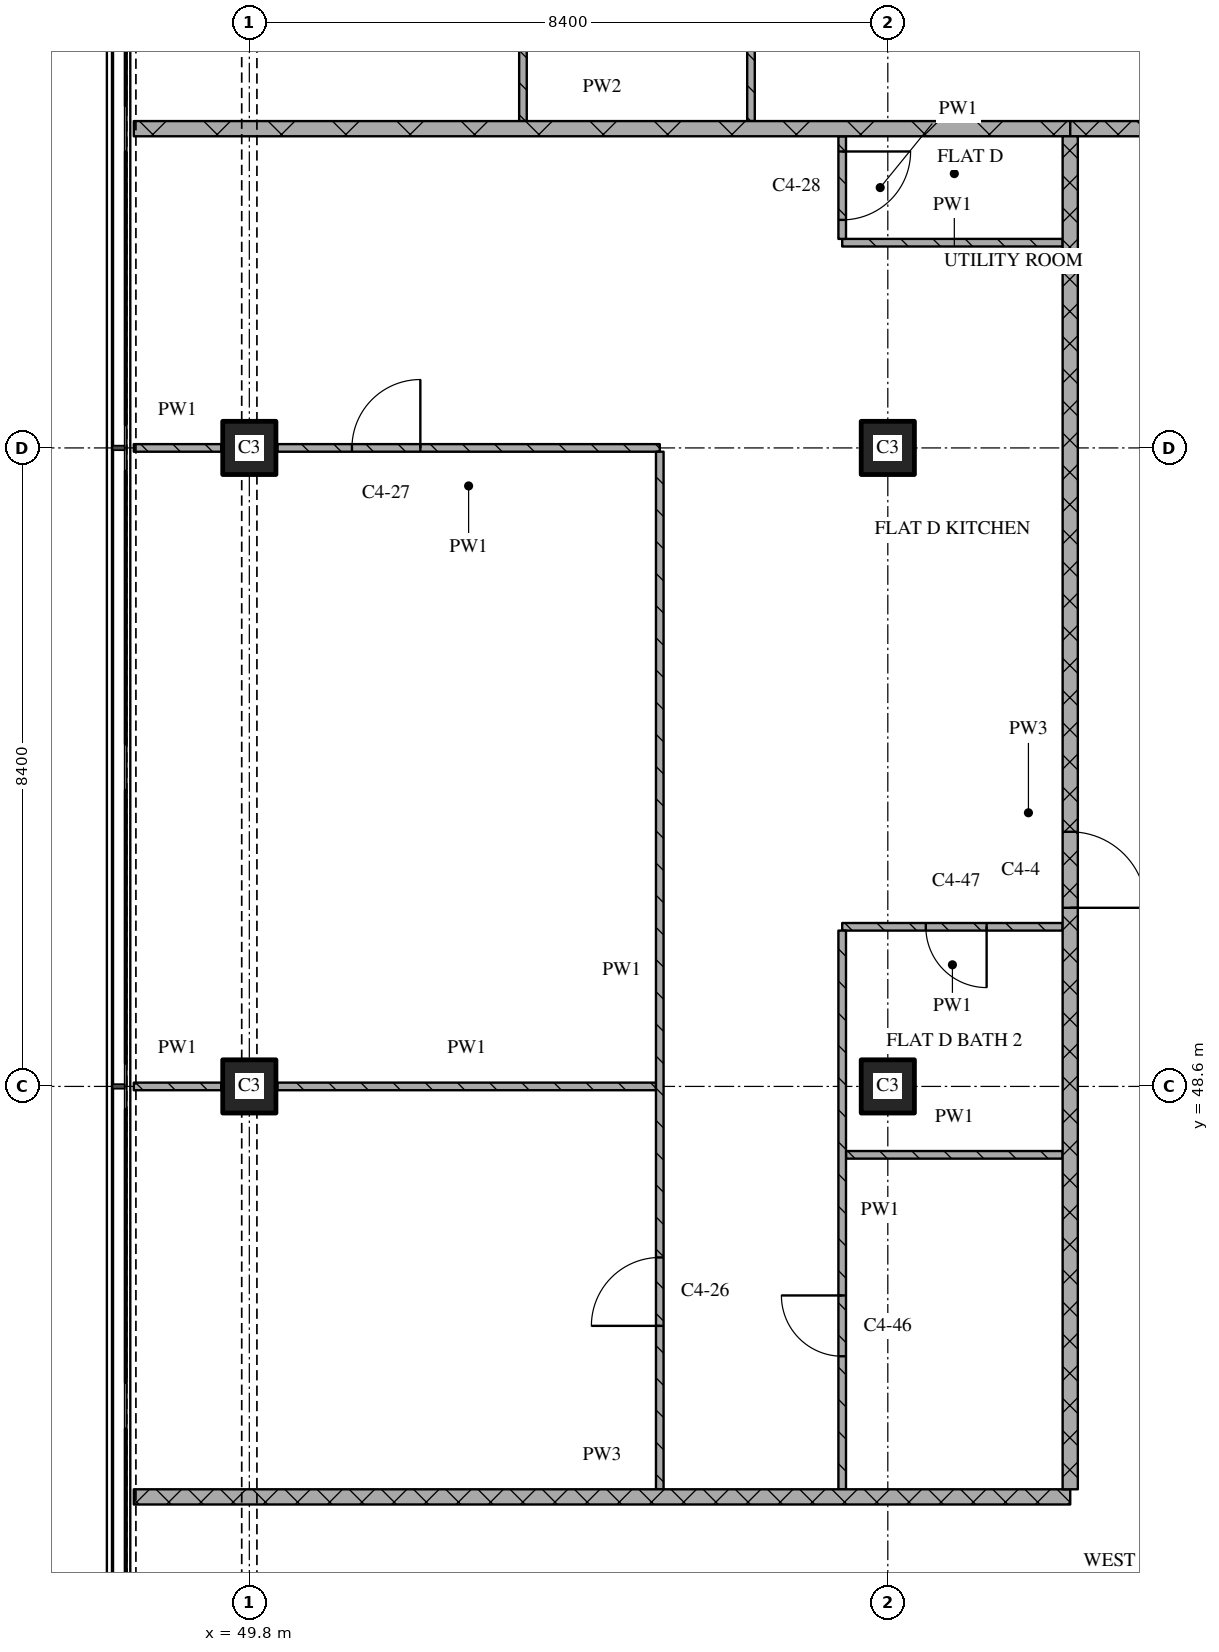
"""IFC4 building model, lengths in metres.
Left out: names, types, materials, properties, quantities, classifications, styles, units other than length and angle.
Written with IfcOpenShell. Run it as: python <this file> out.ifc"""

import sys

from ifc_helpers import new_model, si_unit, direction, frame, frame_2d, origin, origin_2d, place, context, subcontext, project, spatial, rectangle, extrude, element, fill, save


model = new_model("IFC4")
c1 = context("Model", 3, precision=1e-05, world=origin(), true_north=direction((0.0, 1.0)))
c2 = subcontext(c1, "Body", "Model", "MODEL_VIEW")
j1 = project(units=[si_unit("LENGTHUNIT", "METRE"), si_unit("PLANEANGLEUNIT", "RADIAN")], contexts=[c1])
p1 = place(None, origin())
s1 = spatial("IfcSite", under=j1, at=p1, CompositionType="ELEMENT")
p2 = place(p1, origin())
s2 = spatial("IfcBuilding", under=s1, at=p2, CompositionType="ELEMENT")
p3 = place(p2, frame((0.0, 0.0, 183.45)))
s3 = spatial("IfcBuildingStorey", under=s2, at=p3, CompositionType="ELEMENT", Elevation=183.45)
for number, where, z_axis, x_axis in (
    (1, (49.8, 48.6, 0.0), (0.0, 0.0, 1.0), (1.0, 0.0, 0.0)),
    (2, (49.8, 57.0, 0.0), (0.0, 0.0, 1.0), (1.0, 0.0, 0.0)),
    (3, (58.2, 48.6, 0.0), (0.0, 0.0, 1.0), (1.0, 0.0, 0.0)),
    (4, (58.2, 57.0, 0.0), (0.0, 0.0, 1.0), (1.0, 0.0, 0.0)),
):
    element("IfcColumn", number, at=place(p3, frame(where, z_axis=z_axis, x_axis=x_axis)), inside=s3, PredefinedType="COLUMN", context=c2, shape_type="SweptSolid", body=[
        extrude(rectangle(XDim=0.7, YDim=0.7, at=origin_2d()), origin(), (0.0, 0.0, 1.0), 3.6),
    ])
p4 = place(p3, frame((48.28, 43.2, 0.0), z_axis=(0.0, 0.0, 1.0), x_axis=(1.0, 0.0, 0.0)))
e5 = element("IfcWall", 5, at=p4, inside=s3, PredefinedType="PARTITIONING", context=c2, shape_type="SweptSolid", body=[
    extrude(rectangle(XDim=12.32, YDim=0.2, at=frame_2d((6.16, 0.0))), origin(), (0.0, 0.0, 1.0), 3.32),
])
p5 = place(p3, frame((57.65, 47.7, 0.0), z_axis=(0.0, 0.0, 1.0), x_axis=(1.0, 0.0, 0.0)))
e6 = element("IfcWall", 6, at=p5, inside=s3, PredefinedType="PARTITIONING", context=c2, shape_type="SweptSolid", body=[
    extrude(rectangle(XDim=2.85, YDim=0.1, at=frame_2d((1.425, 0.0))), origin(), (0.0, 0.0, 1.0), 3.32),
])
p6 = place(p3, frame((48.28, 48.6, 0.0), z_axis=(0.0, 0.0, 1.0), x_axis=(1.0, 0.0, 0.0)))
e7 = element("IfcWall", 7, at=p6, inside=s3, PredefinedType="PARTITIONING", context=c2, shape_type="SweptSolid", body=[
    extrude(rectangle(XDim=1.15, YDim=0.1, at=frame_2d((0.575, 0.0))), origin(), (0.0, 0.0, 1.0), 3.32),
])
p7 = place(p3, frame((50.17, 48.6, 0.0), z_axis=(0.0, 0.0, 1.0), x_axis=(1.0, 0.0, 0.0)))
e8 = element("IfcWall", 8, at=p7, inside=s3, PredefinedType="PARTITIONING", context=c2, shape_type="SweptSolid", body=[
    extrude(rectangle(XDim=4.98, YDim=0.1, at=frame_2d((2.49, 0.0))), origin(), (0.0, 0.0, 1.0), 3.32),
])
p8 = place(p3, frame((60.5, 50.7, 0.0), z_axis=(0.0, 0.0, 1.0), x_axis=(-1.0, 0.0, 0.0)))
e9 = element("IfcWall", 9, at=p8, inside=s3, PredefinedType="PARTITIONING", context=c2, shape_type="SweptSolid", body=[
    extrude(rectangle(XDim=2.9, YDim=0.1, at=frame_2d((1.45, 0.0))), origin(), (0.0, 0.0, 1.0), 3.32),
])
p9 = place(p8, frame((1.0, 0.0, 0.0)))
e10 = element("IfcOpeningElement", 10, at=p9, cuts=e9, PredefinedType="OPENING", context=c2, shape_type="SweptSolid", body=[
    extrude(rectangle(XDim=0.8, YDim=2.1, at=frame_2d((0.4, 1.05))), frame((0.0, 0.06, 0.0), z_axis=(0.0, -1.0, 0.0), x_axis=(1.0, 0.0, 0.0)), (0.0, 0.0, 1.0), 0.12),
])
p10 = place(p3, frame((48.28, 57.0, 0.0), z_axis=(0.0, 0.0, 1.0), x_axis=(1.0, 0.0, 0.0)))
e11 = element("IfcWall", 11, at=p10, inside=s3, PredefinedType="PARTITIONING", context=c2, shape_type="SweptSolid", body=[
    extrude(rectangle(XDim=1.15, YDim=0.1, at=frame_2d((0.575, 0.0))), origin(), (0.0, 0.0, 1.0), 3.32),
])
p11 = place(p3, frame((55.2, 57.0, 0.0), z_axis=(0.0, 0.0, 1.0), x_axis=(-1.0, 0.0, 0.0)))
e12 = element("IfcWall", 12, at=p11, inside=s3, PredefinedType="PARTITIONING", context=c2, shape_type="SweptSolid", body=[
    extrude(rectangle(XDim=5.03, YDim=0.1, at=frame_2d((2.515, 0.0))), origin(), (0.0, 0.0, 1.0), 3.32),
])
p12 = place(p11, frame((3.15, 0.0, 0.0)))
e13 = element("IfcOpeningElement", 13, at=p12, cuts=e12, PredefinedType="OPENING", context=c2, shape_type="SweptSolid", body=[
    extrude(rectangle(XDim=0.9, YDim=2.1, at=frame_2d((0.45, 1.05))), frame((0.0, 0.06, 0.0), z_axis=(0.0, -1.0, 0.0), x_axis=(1.0, 0.0, 0.0)), (0.0, 0.0, 1.0), 0.12),
])
p13 = place(p3, frame((57.6, 59.7, 0.0), z_axis=(0.0, 0.0, 1.0), x_axis=(1.0, 0.0, 0.0)))
e14 = element("IfcWall", 14, at=p13, inside=s3, PredefinedType="PARTITIONING", context=c2, shape_type="SweptSolid", body=[
    extrude(rectangle(XDim=2.9, YDim=0.1, at=frame_2d((1.45, 0.0))), origin(), (0.0, 0.0, 1.0), 3.32),
])
p14 = place(p3, frame((60.6, 61.2, 0.0), z_axis=(0.0, 0.0, 1.0), x_axis=(1.0, 0.0, 0.0)))
e15 = element("IfcWall", 15, at=p14, inside=s3, PredefinedType="PARTITIONING", context=c2, shape_type="SweptSolid", body=[
    extrude(rectangle(XDim=3.6, YDim=0.2, at=frame_2d((1.8, 0.0))), origin(), (0.0, 0.0, 1.0), 3.32),
])
p15 = place(p3, frame((48.28, 61.2, 0.0), z_axis=(0.0, 0.0, 1.0), x_axis=(1.0, 0.0, 0.0)))
e16 = element("IfcWall", 16, at=p15, inside=s3, PredefinedType="PARTITIONING", context=c2, shape_type="SweptSolid", body=[
    extrude(rectangle(XDim=12.32, YDim=0.2, at=frame_2d((6.16, 0.0))), origin(), (0.0, 0.0, 1.0), 3.32),
])
p16 = place(p3, frame((53.4, 65.35, 0.0), z_axis=(0.0, 0.0, 1.0), x_axis=(0.0, -1.0, 0.0)))
e17 = element("IfcWall", 17, at=p16, inside=s3, PredefinedType="PARTITIONING", context=c2, shape_type="SweptSolid", body=[
    extrude(rectangle(XDim=4.05, YDim=0.1, at=frame_2d((2.025, 0.0))), origin(), (0.0, 0.0, 1.0), 3.32),
])
p17 = place(p3, frame((55.2, 43.3, 0.0), z_axis=(0.0, 0.0, 1.0), x_axis=(0.0, 1.0, 0.0)))
e18 = element("IfcWall", 18, at=p17, inside=s3, PredefinedType="PARTITIONING", context=c2, shape_type="SweptSolid", body=[
    extrude(rectangle(XDim=13.65, YDim=0.1, at=frame_2d((6.825, 0.0))), origin(), (0.0, 0.0, 1.0), 3.32),
])
p18 = place(p17, frame((2.15, 0.0, 0.0)))
e19 = element("IfcOpeningElement", 19, at=p18, cuts=e18, PredefinedType="OPENING", context=c2, shape_type="SweptSolid", body=[
    extrude(rectangle(XDim=0.9, YDim=2.1, at=frame_2d((0.45, 1.05))), frame((0.0, 0.06, 0.0), z_axis=(0.0, -1.0, 0.0), x_axis=(1.0, 0.0, 0.0)), (0.0, 0.0, 1.0), 0.12),
])
p19 = place(p3, frame((56.4, 64.45, 0.0), z_axis=(0.0, 0.0, 1.0), x_axis=(0.0, -1.0, 0.0)))
e20 = element("IfcWall", 20, at=p19, inside=s3, PredefinedType="PARTITIONING", context=c2, shape_type="SweptSolid", body=[
    extrude(rectangle(XDim=3.15, YDim=0.1, at=frame_2d((1.575, 0.0))), origin(), (0.0, 0.0, 1.0), 3.32),
])
p20 = place(p3, frame((57.6, 50.65, 0.0), z_axis=(0.0, 0.0, 1.0), x_axis=(0.0, -1.0, 0.0)))
e21 = element("IfcWall", 21, at=p20, inside=s3, PredefinedType="PARTITIONING", context=c2, shape_type="SweptSolid", body=[
    extrude(rectangle(XDim=7.35, YDim=0.1, at=frame_2d((3.675, 0.0))), origin(), (0.0, 0.0, 1.0), 3.32),
])
p21 = place(p20, frame((4.8, 0.0, 0.0)))
e22 = element("IfcOpeningElement", 22, at=p21, cuts=e21, PredefinedType="OPENING", context=c2, shape_type="SweptSolid", body=[
    extrude(rectangle(XDim=0.8, YDim=2.1, at=frame_2d((0.4, 1.05))), frame((0.0, 0.06, 0.0), z_axis=(0.0, -1.0, 0.0), x_axis=(1.0, 0.0, 0.0)), (0.0, 0.0, 1.0), 0.12),
])
p22 = place(p3, frame((57.6, 61.1, 0.0), z_axis=(0.0, 0.0, 1.0), x_axis=(0.0, -1.0, 0.0)))
e23 = element("IfcWall", 23, at=p22, inside=s3, PredefinedType="PARTITIONING", context=c2, shape_type="SweptSolid", body=[
    extrude(rectangle(XDim=1.35, YDim=0.1, at=frame_2d((0.675, 0.0))), origin(), (0.0, 0.0, 1.0), 3.32),
])
p23 = place(p22, frame((0.2, 0.0, 0.0)))
e24 = element("IfcOpeningElement", 24, at=p23, cuts=e23, PredefinedType="OPENING", context=c2, shape_type="SweptSolid", body=[
    extrude(rectangle(XDim=0.9, YDim=2.1, at=frame_2d((0.45, 1.05))), frame((0.0, 0.06, 0.0), z_axis=(0.0, -1.0, 0.0), x_axis=(1.0, 0.0, 0.0)), (0.0, 0.0, 1.0), 0.12),
])
p24 = place(p3, frame((60.6, 43.3, 0.0), z_axis=(0.0, 0.0, 1.0), x_axis=(0.0, 1.0, 0.0)))
e25 = element("IfcWall", 25, at=p24, inside=s3, PredefinedType="PARTITIONING", context=c2, shape_type="SweptSolid", body=[
    extrude(rectangle(XDim=17.8, YDim=0.2, at=frame_2d((8.9, 0.0))), origin(), (0.0, 0.0, 1.0), 3.32),
])
p25 = place(p24, frame((7.65, 0.0, 0.0)))
e26 = element("IfcOpeningElement", 26, at=p25, cuts=e25, PredefinedType="OPENING", context=c2, shape_type="SweptSolid", body=[
    extrude(rectangle(XDim=1.0, YDim=2.1, at=frame_2d((0.5, 1.05))), frame((0.0, 0.11, 0.0), z_axis=(0.0, -1.0, 0.0), x_axis=(1.0, 0.0, 0.0)), (0.0, 0.0, 1.0), 0.22),
])
p26 = place(p9, origin())
e27 = element("IfcDoor", 27, at=p26, inside=s3, OperationType="SINGLE_SWING_LEFT", PredefinedType="DOOR", context=c2, shape_type="SweptSolid", body=[
    extrude(rectangle(XDim=0.8, YDim=2.1, at=frame_2d((0.4, 1.05))), frame((0.0, 0.025, 0.0), z_axis=(0.0, -1.0, 0.0), x_axis=(1.0, 0.0, 0.0)), (0.0, 0.0, 1.0), 0.05),
])
fill(e10, e27)
p27 = place(p12, origin())
e28 = element("IfcDoor", 28, at=p27, inside=s3, OperationType="SINGLE_SWING_RIGHT", PredefinedType="DOOR", context=c2, shape_type="SweptSolid", body=[
    extrude(rectangle(XDim=0.9, YDim=2.1, at=frame_2d((0.45, 1.05))), frame((0.0, 0.025, 0.0), z_axis=(0.0, -1.0, 0.0), x_axis=(1.0, 0.0, 0.0)), (0.0, 0.0, 1.0), 0.05),
])
fill(e13, e28)
p28 = place(p18, origin())
e29 = element("IfcDoor", 29, at=p28, inside=s3, OperationType="SINGLE_SWING_LEFT", PredefinedType="DOOR", context=c2, shape_type="SweptSolid", body=[
    extrude(rectangle(XDim=0.9, YDim=2.1, at=frame_2d((0.45, 1.05))), frame((0.0, 0.025, 0.0), z_axis=(0.0, -1.0, 0.0), x_axis=(1.0, 0.0, 0.0)), (0.0, 0.0, 1.0), 0.05),
])
fill(e19, e29)
p29 = place(p21, origin())
e30 = element("IfcDoor", 30, at=p29, inside=s3, OperationType="SINGLE_SWING_RIGHT", PredefinedType="DOOR", context=c2, shape_type="SweptSolid", body=[
    extrude(rectangle(XDim=0.8, YDim=2.1, at=frame_2d((0.4, 1.05))), frame((0.0, 0.025, 0.0), z_axis=(0.0, -1.0, 0.0), x_axis=(1.0, 0.0, 0.0)), (0.0, 0.0, 1.0), 0.05),
])
fill(e22, e30)
p30 = place(p23, origin())
e31 = element("IfcDoor", 31, at=p30, inside=s3, OperationType="SINGLE_SWING_LEFT", PredefinedType="DOOR", context=c2, shape_type="SweptSolid", body=[
    extrude(rectangle(XDim=0.9, YDim=2.1, at=frame_2d((0.45, 1.05))), frame((0.0, 0.025, 0.0), z_axis=(0.0, -1.0, 0.0), x_axis=(1.0, 0.0, 0.0)), (0.0, 0.0, 1.0), 0.05),
])
fill(e24, e31)
p31 = place(p25, origin())
e32 = element("IfcDoor", 32, at=p31, inside=s3, OperationType="SINGLE_SWING_RIGHT", PredefinedType="DOOR", context=c2, shape_type="SweptSolid", body=[
    extrude(rectangle(XDim=1.0, YDim=2.1, at=frame_2d((0.5, 1.05))), frame((0.0, 0.025, 0.0), z_axis=(0.0, -1.0, 0.0), x_axis=(1.0, 0.0, 0.0)), (0.0, 0.0, 1.0), 0.05),
])
fill(e26, e32)
save(model, sys.argv[1])
